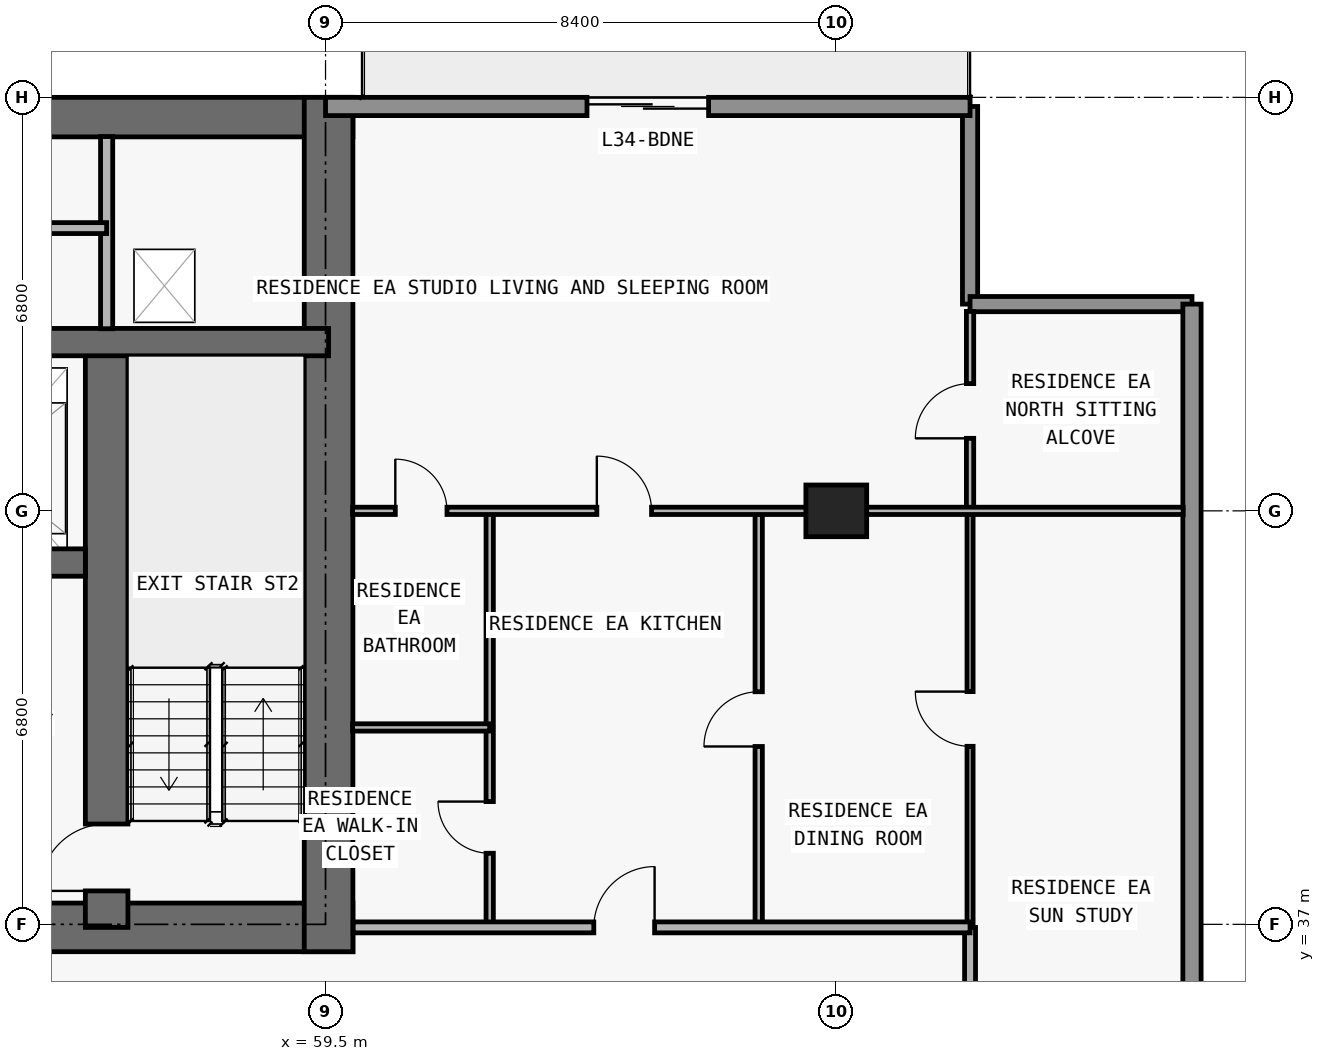
"""IFC4 building model, lengths in metres.
Left out: names, types, materials, properties, quantities, classifications, styles, units other than length and angle.
Written with IfcOpenShell. Run it as: python <this file> out.ifc"""

import sys

from ifc_helpers import new_model, si_unit, direction, frame, frame_2d, origin, origin_2d, place, context, subcontext, project, spatial, rectangle, extrude, element, fill, save


model = new_model("IFC4")
c1 = context("Model", 3, precision=1e-05, world=origin(), true_north=direction((0.0, 1.0)))
c2 = subcontext(c1, "Body", "Model", "MODEL_VIEW")
j1 = project(units=[si_unit("LENGTHUNIT", "METRE"), si_unit("PLANEANGLEUNIT", "RADIAN")], contexts=[c1])
p1 = place(None, origin())
s1 = spatial("IfcSite", under=j1, at=p1, CompositionType="ELEMENT")
p2 = place(p1, origin())
s2 = spatial("IfcBuilding", under=s1, at=p2, CompositionType="ELEMENT")
p3 = place(p2, frame((0.0, 0.0, 125.7)))
s3 = spatial("IfcBuildingStorey", under=s2, at=p3, CompositionType="ELEMENT", Elevation=125.7)
p4 = place(p3, frame((67.9, 43.8, 0.0), z_axis=(0.0, 0.0, 1.0), x_axis=(1.0, 0.0, 0.0)))
e1 = element("IfcColumn", 1, at=p4, inside=s3, PredefinedType="COLUMN", context=c2, shape_type="SweptSolid", body=[
    extrude(rectangle(XDim=1.0, YDim=0.85, at=origin_2d()), origin(), (0.0, 0.0, 1.0), 3.05),
])
p5 = place(p3, frame((17.85, 36.95, 0.0), z_axis=(0.0, 0.0, 1.0), x_axis=(1.0, 0.0, 0.0)))
e2 = element("IfcWall", 2, at=p5, inside=s3, PredefinedType="SHEAR", context=c2, shape_type="SweptSolid", body=[
    extrude(rectangle(XDim=42.1, YDim=0.8, at=frame_2d((21.05, 0.0))), origin(), (0.0, 0.0, 1.0), 3.05),
])
p6 = place(p5, frame((14.45, 0.0, 0.0)))
e3 = element("IfcOpeningElement", 3, at=p6, cuts=e2, PredefinedType="OPENING", context=c2, shape_type="SweptSolid", body=[
    extrude(rectangle(XDim=1.1, YDim=2.15, at=frame_2d((0.55, 1.075))), frame((0.0, 0.41, 0.0), z_axis=(0.0, -1.0, 0.0), x_axis=(1.0, 0.0, 0.0)), (0.0, 0.0, 1.0), 0.82),
])
p7 = place(p5, frame((6.3, 0.0, 0.0)))
e4 = element("IfcOpeningElement", 4, at=p7, cuts=e2, PredefinedType="OPENING", context=c2, shape_type="SweptSolid", body=[
    extrude(rectangle(XDim=1.05, YDim=2.15, at=frame_2d((0.525, 1.075))), frame((0.0, 0.41, 0.0), z_axis=(0.0, -1.0, 0.0), x_axis=(1.0, 0.0, 0.0)), (0.0, 0.0, 1.0), 0.82),
])
p8 = place(p5, frame((34.8, 0.0, 0.0)))
e5 = element("IfcOpeningElement", 5, at=p8, cuts=e2, PredefinedType="OPENING", context=c2, shape_type="SweptSolid", body=[
    extrude(rectangle(XDim=1.05, YDim=2.15, at=frame_2d((0.525, 1.075))), frame((0.0, 0.41, 0.0), z_axis=(0.0, -1.0, 0.0), x_axis=(1.0, 0.0, 0.0)), (0.0, 0.0, 1.0), 0.82),
])
p9 = place(p5, frame((10.913, 0.0, 0.0)))
e6 = element("IfcOpeningElement", 6, at=p9, cuts=e2, PredefinedType="OPENING", context=c2, shape_type="SweptSolid", body=[
    extrude(rectangle(XDim=1.05, YDim=2.15, at=frame_2d((0.525, 1.075))), frame((0.0, 0.41, 0.0), z_axis=(0.0, -1.0, 0.0), x_axis=(1.0, 0.0, 0.0)), (0.0, 0.0, 1.0), 0.82),
])
p10 = place(p5, frame((24.15, 0.0, 0.0)))
e7 = element("IfcOpeningElement", 7, at=p10, cuts=e2, PredefinedType="OPENING", context=c2, shape_type="SweptSolid", body=[
    extrude(rectangle(XDim=1.05, YDim=2.15, at=frame_2d((0.525, 1.075))), frame((0.0, 0.41, 0.0), z_axis=(0.0, -1.0, 0.0), x_axis=(1.0, 0.0, 0.0)), (0.0, 0.0, 1.0), 0.82),
])
p11 = place(p3, frame((17.85, 50.275, 0.0), z_axis=(0.0, 0.0, 1.0), x_axis=(1.0, 0.0, 0.0)))
e8 = element("IfcWall", 8, at=p11, inside=s3, PredefinedType="SHEAR", context=c2, shape_type="SweptSolid", body=[
    extrude(rectangle(XDim=42.1, YDim=0.65, at=frame_2d((21.05, 0.0))), origin(), (0.0, 0.0, 1.0), 3.05),
])
p12 = place(p3, frame((59.55, 36.55, 0.0), z_axis=(0.0, 0.0, 1.0), x_axis=(0.0, 1.0, 0.0)))
e9 = element("IfcWall", 9, at=p12, inside=s3, PredefinedType="SHEAR", context=c2, shape_type="SweptSolid", body=[
    extrude(rectangle(XDim=14.05, YDim=0.8, at=frame_2d((7.025, 0.0))), origin(), (0.0, 0.0, 1.0), 3.05),
])
p13 = place(p3, frame((55.9, 36.95, 0.0), z_axis=(0.0, 0.0, 1.0), x_axis=(0.0, 1.0, 0.0)))
e10 = element("IfcWall", 10, at=p13, inside=s3, PredefinedType="SHEAR", context=c2, shape_type="SweptSolid", body=[
    extrude(rectangle(XDim=9.625, YDim=0.7, at=frame_2d((4.812, 0.0))), origin(), (0.0, 0.0, 1.0), 3.05),
])
p14 = place(p13, frame((0.6, 0.0, 0.0)))
e11 = element("IfcOpeningElement", 11, at=p14, cuts=e10, PredefinedType="OPENING", context=c2, shape_type="SweptSolid", body=[
    extrude(rectangle(XDim=1.1, YDim=2.15, at=frame_2d((0.55, 1.075))), frame((0.0, 0.36, 0.0), z_axis=(0.0, -1.0, 0.0), x_axis=(1.0, 0.0, 0.0)), (0.0, 0.0, 1.0), 0.72),
])
p15 = place(p3, frame((22.25, 42.95, 0.0), z_axis=(0.0, 0.0, 1.0), x_axis=(1.0, 0.0, 0.0)))
e12 = element("IfcWall", 12, at=p15, inside=s3, PredefinedType="SHEAR", context=c2, shape_type="SweptSolid", body=[
    extrude(rectangle(XDim=33.3, YDim=0.45, at=frame_2d((16.65, 0.0))), origin(), (0.0, 0.0, 1.0), 3.05),
])
p16 = place(p15, frame((1.05, 0.0, 0.0)))
e13 = element("IfcOpeningElement", 13, at=p16, cuts=e12, PredefinedType="OPENING", context=c2, shape_type="SweptSolid", body=[
    extrude(rectangle(XDim=1.2, YDim=2.2, at=frame_2d((0.6, 1.1))), frame((0.0, 0.235, 0.0), z_axis=(0.0, -1.0, 0.0), x_axis=(1.0, 0.0, 0.0)), (0.0, 0.0, 1.0), 0.47),
])
p17 = place(p15, frame((31.05, 0.0, 0.0)))
e14 = element("IfcOpeningElement", 14, at=p17, cuts=e12, PredefinedType="OPENING", context=c2, shape_type="SweptSolid", body=[
    extrude(rectangle(XDim=1.2, YDim=2.2, at=frame_2d((0.6, 1.1))), frame((0.0, 0.235, 0.0), z_axis=(0.0, -1.0, 0.0), x_axis=(1.0, 0.0, 0.0)), (0.0, 0.0, 1.0), 0.47),
])
p18 = place(p15, frame((21.4, 0.0, 0.0)))
e15 = element("IfcOpeningElement", 15, at=p18, cuts=e12, PredefinedType="OPENING", context=c2, shape_type="SweptSolid", body=[
    extrude(rectangle(XDim=1.1, YDim=2.2, at=frame_2d((0.55, 1.1))), frame((0.0, 0.235, 0.0), z_axis=(0.0, -1.0, 0.0), x_axis=(1.0, 0.0, 0.0)), (0.0, 0.0, 1.0), 0.47),
])
p19 = place(p15, frame((24.0, 0.0, 0.0)))
e16 = element("IfcOpeningElement", 16, at=p19, cuts=e12, PredefinedType="OPENING", context=c2, shape_type="SweptSolid", body=[
    extrude(rectangle(XDim=1.1, YDim=2.2, at=frame_2d((0.55, 1.1))), frame((0.0, 0.235, 0.0), z_axis=(0.0, -1.0, 0.0), x_axis=(1.0, 0.0, 0.0)), (0.0, 0.0, 1.0), 0.47),
])
p20 = place(p15, frame((3.625, 0.0, 0.0)))
e17 = element("IfcOpeningElement", 17, at=p20, cuts=e12, PredefinedType="OPENING", context=c2, shape_type="SweptSolid", body=[
    extrude(rectangle(XDim=1.05, YDim=2.15, at=frame_2d((0.525, 1.075))), frame((0.0, 0.235, 0.0), z_axis=(0.0, -1.0, 0.0), x_axis=(1.0, 0.0, 0.0)), (0.0, 0.0, 1.0), 0.47),
])
p21 = place(p15, frame((28.675, 0.0, 0.0)))
e18 = element("IfcOpeningElement", 18, at=p21, cuts=e12, PredefinedType="OPENING", context=c2, shape_type="SweptSolid", body=[
    extrude(rectangle(XDim=1.05, YDim=2.15, at=frame_2d((0.525, 1.075))), frame((0.0, 0.235, 0.0), z_axis=(0.0, -1.0, 0.0), x_axis=(1.0, 0.0, 0.0)), (0.0, 0.0, 1.0), 0.47),
])
p22 = place(p15, frame((15.975, 0.0, 0.0)))
e19 = element("IfcOpeningElement", 19, at=p22, cuts=e12, PredefinedType="OPENING", context=c2, shape_type="SweptSolid", body=[
    extrude(rectangle(XDim=1.0, YDim=2.2, at=frame_2d((0.5, 1.1))), frame((0.0, 0.235, 0.0), z_axis=(0.0, -1.0, 0.0), x_axis=(1.0, 0.0, 0.0)), (0.0, 0.0, 1.0), 0.47),
])
p23 = place(p3, frame((18.25, 46.575, 0.0), z_axis=(0.0, 0.0, 1.0), x_axis=(1.0, 0.0, 0.0)))
e20 = element("IfcWall", 20, at=p23, inside=s3, PredefinedType="SHEAR", context=c2, shape_type="SweptSolid", body=[
    extrude(rectangle(XDim=41.3, YDim=0.45, at=frame_2d((20.65, 0.0))), origin(), (0.0, 0.0, 1.0), 3.05),
])
p24 = place(p23, frame((7.625, 0.0, 0.0)))
e21 = element("IfcOpeningElement", 21, at=p24, cuts=e20, PredefinedType="OPENING", context=c2, shape_type="SweptSolid", body=[
    extrude(rectangle(XDim=1.05, YDim=2.15, at=frame_2d((0.525, 1.075))), frame((0.0, 0.235, 0.0), z_axis=(0.0, -1.0, 0.0), x_axis=(1.0, 0.0, 0.0)), (0.0, 0.0, 1.0), 0.47),
])
p25 = place(p23, frame((32.675, 0.0, 0.0)))
e22 = element("IfcOpeningElement", 22, at=p25, cuts=e20, PredefinedType="OPENING", context=c2, shape_type="SweptSolid", body=[
    extrude(rectangle(XDim=1.05, YDim=2.15, at=frame_2d((0.525, 1.075))), frame((0.0, 0.235, 0.0), z_axis=(0.0, -1.0, 0.0), x_axis=(1.0, 0.0, 0.0)), (0.0, 0.0, 1.0), 0.47),
])
p26 = place(p3, frame((70.1, 50.45, 0.0), z_axis=(0.0, 0.0, 1.0), x_axis=(0.0, -1.0, 0.0)))
e23 = element("IfcWall", 23, at=p26, inside=s3, PredefinedType="ELEMENTEDWALL", context=c2, shape_type="SweptSolid", body=[
    extrude(rectangle(XDim=3.25, YDim=0.25, at=frame_2d((1.625, 0.0))), origin(), (0.0, 0.0, 1.0), 3.05),
])
p27 = place(p3, frame((70.1, 47.2, 0.0), z_axis=(0.0, 0.0, 1.0), x_axis=(1.0, 0.0, 0.0)))
e24 = element("IfcWall", 24, at=p27, inside=s3, PredefinedType="ELEMENTEDWALL", context=c2, shape_type="SweptSolid", body=[
    extrude(rectangle(XDim=3.65, YDim=0.25, at=frame_2d((1.825, 0.0))), origin(), (0.0, 0.0, 1.0), 3.05),
])
p28 = place(p3, frame((73.75, 47.2, 0.0), z_axis=(0.0, 0.0, 1.0), x_axis=(0.0, -1.0, 0.0)))
e25 = element("IfcWall", 25, at=p28, inside=s3, PredefinedType="STANDARD", context=c2, shape_type="SweptSolid", body=[
    extrude(rectangle(XDim=19.2, YDim=0.3, at=frame_2d((9.6, 0.0))), origin(), (0.0, 0.0, 1.0), 3.05),
])
p29 = place(p3, frame((59.5, 50.45, 0.0), z_axis=(0.0, 0.0, 1.0), x_axis=(1.0, 0.0, 0.0)))
e26 = element("IfcWall", 26, at=p29, inside=s3, PredefinedType="STANDARD", context=c2, shape_type="SweptSolid", body=[
    extrude(rectangle(XDim=10.6, YDim=0.3, at=frame_2d((5.3, 0.0))), origin(), (0.0, 0.0, 1.0), 3.05),
])
p30 = place(p29, frame((4.3, 0.0, 0.0)))
e27 = element("IfcOpeningElement", 27, at=p30, cuts=e26, PredefinedType="OPENING", context=c2, shape_type="SweptSolid", body=[
    extrude(rectangle(XDim=2.0, YDim=2.3, at=frame_2d((1.0, 1.15))), frame((0.0, 0.16, 0.0), z_axis=(0.0, -1.0, 0.0), x_axis=(1.0, 0.0, 0.0)), (0.0, 0.0, 1.0), 0.32),
])
p31 = place(p3, frame((55.9, 46.795, 0.0), z_axis=(0.0, 0.0, 1.0), x_axis=(0.0, 1.0, 0.0)))
e28 = element("IfcWall", 28, at=p31, inside=s3, PredefinedType="PARTITIONING", context=c2, shape_type="SweptSolid", body=[
    extrude(rectangle(XDim=3.16, YDim=0.2, at=frame_2d((1.58, 0.0))), origin(), (0.0, 0.0, 1.0), 3.05),
])
p32 = place(p3, frame((62.2, 36.95, 0.0), z_axis=(0.0, 0.0, 1.0), x_axis=(0.0, 1.0, 0.0)))
e29 = element("IfcWall", 29, at=p32, inside=s3, PredefinedType="PARTITIONING", context=c2, shape_type="SweptSolid", body=[
    extrude(rectangle(XDim=6.85, YDim=0.12, at=frame_2d((3.425, 0.0))), origin(), (0.0, 0.0, 1.0), 3.05),
])
p33 = place(p32, frame((1.219, 0.0, 0.0)))
e30 = element("IfcOpeningElement", 30, at=p33, cuts=e29, PredefinedType="OPENING", context=c2, shape_type="SweptSolid", body=[
    extrude(rectangle(XDim=0.85, YDim=2.1, at=frame_2d((0.425, 1.05))), frame((0.0, 0.07, 0.0), z_axis=(0.0, -1.0, 0.0), x_axis=(1.0, 0.0, 0.0)), (0.0, 0.0, 1.0), 0.14),
])
p34 = place(p3, frame((66.624, 36.95, 0.0), z_axis=(0.0, 0.0, 1.0), x_axis=(0.0, 1.0, 0.0)))
e31 = element("IfcWall", 31, at=p34, inside=s3, PredefinedType="PARTITIONING", context=c2, shape_type="SweptSolid", body=[
    extrude(rectangle(XDim=6.85, YDim=0.12, at=frame_2d((3.425, 0.0))), origin(), (0.0, 0.0, 1.0), 3.05),
])
p35 = place(p34, frame((2.975, 0.0, 0.0)))
e32 = element("IfcOpeningElement", 32, at=p35, cuts=e31, PredefinedType="OPENING", context=c2, shape_type="SweptSolid", body=[
    extrude(rectangle(XDim=0.9, YDim=2.15, at=frame_2d((0.45, 1.075))), frame((0.0, 0.07, 0.0), z_axis=(0.0, -1.0, 0.0), x_axis=(1.0, 0.0, 0.0)), (0.0, 0.0, 1.0), 0.14),
])
p36 = place(p3, frame((70.1, 34.705, 0.0), z_axis=(0.0, 0.0, 1.0), x_axis=(0.0, 1.0, 0.0)))
e33 = element("IfcWall", 33, at=p36, inside=s3, PredefinedType="PARTITIONING", context=c2, shape_type="SweptSolid", body=[
    extrude(rectangle(XDim=2.245, YDim=0.18, at=frame_2d((1.123, 0.0))), origin(), (0.0, 0.0, 1.0), 3.05),
])
p37 = place(p3, frame((70.1, 36.955, 0.0), z_axis=(0.0, 0.0, 1.0), x_axis=(0.0, 1.0, 0.0)))
e34 = element("IfcWall", 34, at=p37, inside=s3, PredefinedType="MOVABLE", context=c2, shape_type="SweptSolid", body=[
    extrude(rectangle(XDim=6.845, YDim=0.1, at=frame_2d((3.422, 0.0))), origin(), (0.0, 0.0, 1.0), 3.05),
])
p38 = place(p37, frame((2.972, 0.0, 0.0)))
e35 = element("IfcOpeningElement", 35, at=p38, cuts=e34, PredefinedType="OPENING", context=c2, shape_type="SweptSolid", body=[
    extrude(rectangle(XDim=0.9, YDim=2.15, at=frame_2d((0.45, 1.075))), frame((0.0, 0.06, 0.0), z_axis=(0.0, -1.0, 0.0), x_axis=(1.0, 0.0, 0.0)), (0.0, 0.0, 1.0), 0.12),
])
p39 = place(p3, frame((70.1, 43.805, 0.0), z_axis=(0.0, 0.0, 1.0), x_axis=(0.0, 1.0, 0.0)))
e36 = element("IfcWall", 36, at=p39, inside=s3, PredefinedType="PARTITIONING", context=c2, shape_type="SweptSolid", body=[
    extrude(rectangle(XDim=3.275, YDim=0.12, at=frame_2d((1.638, 0.0))), origin(), (0.0, 0.0, 1.0), 3.05),
])
p40 = place(p39, frame((1.188, 0.0, 0.0)))
e37 = element("IfcOpeningElement", 37, at=p40, cuts=e36, PredefinedType="OPENING", context=c2, shape_type="SweptSolid", body=[
    extrude(rectangle(XDim=0.9, YDim=2.15, at=frame_2d((0.45, 1.075))), frame((0.0, 0.07, 0.0), z_axis=(0.0, -1.0, 0.0), x_axis=(1.0, 0.0, 0.0)), (0.0, 0.0, 1.0), 0.14),
])
p41 = place(p3, frame((59.955, 36.95, 0.0), z_axis=(0.0, 0.0, 1.0), x_axis=(1.0, 0.0, 0.0)))
e38 = element("IfcWall", 38, at=p41, inside=s3, PredefinedType="PARTITIONING", context=c2, shape_type="SweptSolid", body=[
    extrude(rectangle(XDim=10.145, YDim=0.18, at=frame_2d((5.073, 0.0))), origin(), (0.0, 0.0, 1.0), 3.05),
])
p42 = place(p41, frame((3.957, 0.0, 0.0)))
e39 = element("IfcOpeningElement", 39, at=p42, cuts=e38, PredefinedType="OPENING", context=c2, shape_type="SweptSolid", body=[
    extrude(rectangle(XDim=1.0, YDim=2.2, at=frame_2d((0.5, 1.1))), frame((0.0, 0.1, 0.0), z_axis=(0.0, -1.0, 0.0), x_axis=(1.0, 0.0, 0.0)), (0.0, 0.0, 1.0), 0.2),
])
p43 = place(p3, frame((59.945, 40.238, 0.0), z_axis=(0.0, 0.0, 1.0), x_axis=(1.0, 0.0, 0.0)))
e40 = element("IfcWall", 40, at=p43, inside=s3, PredefinedType="PARTITIONING", context=c2, shape_type="SweptSolid", body=[
    extrude(rectangle(XDim=2.255, YDim=0.12, at=frame_2d((1.127, 0.0))), origin(), (0.0, 0.0, 1.0), 3.05),
])
p44 = place(p3, frame((59.945, 43.8, 0.0), z_axis=(0.0, 0.0, 1.0), x_axis=(1.0, 0.0, 0.0)))
e41 = element("IfcWall", 41, at=p44, inside=s3, PredefinedType="PARTITIONING", context=c2, shape_type="SweptSolid", body=[
    extrude(rectangle(XDim=13.66, YDim=0.12, at=frame_2d((6.83, 0.0))), origin(), (0.0, 0.0, 1.0), 2.339),
])
p45 = place(p44, frame((4.017, 0.0, 0.0)))
e42 = element("IfcOpeningElement", 42, at=p45, cuts=e41, PredefinedType="OPENING", context=c2, shape_type="SweptSolid", body=[
    extrude(rectangle(XDim=0.9, YDim=2.15, at=frame_2d((0.45, 1.075))), frame((0.0, 0.07, 0.0), z_axis=(0.0, -1.0, 0.0), x_axis=(1.0, 0.0, 0.0)), (0.0, 0.0, 1.0), 0.14),
])
p46 = place(p44, frame((0.702, 0.0, 0.0)))
e43 = element("IfcOpeningElement", 43, at=p46, cuts=e41, PredefinedType="OPENING", context=c2, shape_type="SweptSolid", body=[
    extrude(rectangle(XDim=0.85, YDim=2.1, at=frame_2d((0.425, 1.05))), frame((0.0, 0.07, 0.0), z_axis=(0.0, -1.0, 0.0), x_axis=(1.0, 0.0, 0.0)), (0.0, 0.0, 1.0), 0.14),
])
p47 = place(p3, frame((26.7, 48.45, 0.0), z_axis=(0.0, 0.0, 1.0), x_axis=(1.0, 0.0, 0.0)))
e44 = element("IfcWall", 44, at=p47, inside=s3, PredefinedType="PARTITIONING", context=c2, shape_type="SweptSolid", body=[
    extrude(rectangle(XDim=29.2, YDim=0.18, at=frame_2d((14.6, 0.0))), origin(), (0.0, 0.0, 1.0), 3.05),
])
p48 = place(p47, frame((1.75, 0.0, 0.0)))
e45 = element("IfcOpeningElement", 45, at=p48, cuts=e44, PredefinedType="OPENING", context=c2, shape_type="SweptSolid", body=[
    extrude(rectangle(XDim=1.2, YDim=2.2, at=frame_2d((0.6, 1.1))), frame((0.0, 0.1, 0.0), z_axis=(0.0, -1.0, 0.0), x_axis=(1.0, 0.0, 0.0)), (0.0, 0.0, 1.0), 0.2),
])
p49 = place(p47, frame((6.475, 0.0, 0.0)))
e46 = element("IfcOpeningElement", 46, at=p49, cuts=e44, PredefinedType="OPENING", context=c2, shape_type="SweptSolid", body=[
    extrude(rectangle(XDim=1.2, YDim=2.2, at=frame_2d((0.6, 1.1))), frame((0.0, 0.1, 0.0), z_axis=(0.0, -1.0, 0.0), x_axis=(1.0, 0.0, 0.0)), (0.0, 0.0, 1.0), 0.2),
])
p50 = place(p47, frame((14.05, 0.0, 0.0)))
e47 = element("IfcOpeningElement", 47, at=p50, cuts=e44, PredefinedType="OPENING", context=c2, shape_type="SweptSolid", body=[
    extrude(rectangle(XDim=1.0, YDim=2.2, at=frame_2d((0.5, 1.1))), frame((0.0, 0.1, 0.0), z_axis=(0.0, -1.0, 0.0), x_axis=(1.0, 0.0, 0.0)), (0.0, 0.0, 1.0), 0.2),
])
p51 = place(p47, frame((21.425, 0.0, 0.0)))
e48 = element("IfcOpeningElement", 48, at=p51, cuts=e44, PredefinedType="OPENING", context=c2, shape_type="SweptSolid", body=[
    extrude(rectangle(XDim=1.2, YDim=2.2, at=frame_2d((0.6, 1.1))), frame((0.0, 0.1, 0.0), z_axis=(0.0, -1.0, 0.0), x_axis=(1.0, 0.0, 0.0)), (0.0, 0.0, 1.0), 0.2),
])
p52 = place(p47, frame((26.375, 0.0, 0.0)))
e49 = element("IfcOpeningElement", 49, at=p52, cuts=e44, PredefinedType="OPENING", context=c2, shape_type="SweptSolid", body=[
    extrude(rectangle(XDim=0.85, YDim=2.1, at=frame_2d((0.425, 1.05))), frame((0.0, 0.1, 0.0), z_axis=(0.0, -1.0, 0.0), x_axis=(1.0, 0.0, 0.0)), (0.0, 0.0, 1.0), 0.2),
])
p53 = place(p30, origin())
e50 = element("IfcDoor", 50, at=p53, inside=s3, OperationType="DOUBLE_DOOR_SLIDING", PredefinedType="DOOR", context=c2, shape_type="SweptSolid", body=[
    extrude(rectangle(XDim=2.0, YDim=2.3, at=frame_2d((1.0, 1.15))), frame((0.0, 0.025, 0.0), z_axis=(0.0, -1.0, 0.0), x_axis=(1.0, 0.0, 0.0)), (0.0, 0.0, 1.0), 0.05),
])
fill(e27, e50)
p54 = place(p14, origin())
e51 = element("IfcDoor", 51, at=p54, inside=s3, OperationType="SINGLE_SWING_LEFT", PredefinedType="DOOR", context=c2, shape_type="SweptSolid", body=[
    extrude(rectangle(XDim=1.1, YDim=2.15, at=frame_2d((0.55, 1.075))), frame((0.0, 0.025, 0.0), z_axis=(0.0, -1.0, 0.0), x_axis=(1.0, 0.0, 0.0)), (0.0, 0.0, 1.0), 0.05),
])
fill(e11, e51)
p55 = place(p35, origin())
e52 = element("IfcDoor", 52, at=p55, inside=s3, OperationType="SINGLE_SWING_LEFT", PredefinedType="DOOR", context=c2, shape_type="SweptSolid", body=[
    extrude(rectangle(XDim=0.9, YDim=2.15, at=frame_2d((0.45, 1.075))), frame((0.0, 0.025, 0.0), z_axis=(0.0, -1.0, 0.0), x_axis=(1.0, 0.0, 0.0)), (0.0, 0.0, 1.0), 0.05),
])
fill(e32, e52)
p56 = place(p42, origin())
e53 = element("IfcDoor", 53, at=p56, inside=s3, OperationType="SINGLE_SWING_RIGHT", PredefinedType="DOOR", context=c2, shape_type="SweptSolid", body=[
    extrude(rectangle(XDim=1.0, YDim=2.2, at=frame_2d((0.5, 1.1))), frame((0.0, 0.025, 0.0), z_axis=(0.0, -1.0, 0.0), x_axis=(1.0, 0.0, 0.0)), (0.0, 0.0, 1.0), 0.05),
])
fill(e39, e53)
p57 = place(p45, origin())
e54 = element("IfcDoor", 54, at=p57, inside=s3, OperationType="SINGLE_SWING_LEFT", PredefinedType="DOOR", context=c2, shape_type="SweptSolid", body=[
    extrude(rectangle(XDim=0.9, YDim=2.15, at=frame_2d((0.45, 1.075))), frame((0.0, 0.025, 0.0), z_axis=(0.0, -1.0, 0.0), x_axis=(1.0, 0.0, 0.0)), (0.0, 0.0, 1.0), 0.05),
])
fill(e42, e54)
p58 = place(p33, origin())
e55 = element("IfcDoor", 55, at=p58, inside=s3, OperationType="SINGLE_SWING_RIGHT", PredefinedType="DOOR", context=c2, shape_type="SweptSolid", body=[
    extrude(rectangle(XDim=0.85, YDim=2.1, at=frame_2d((0.425, 1.05))), frame((0.0, 0.025, 0.0), z_axis=(0.0, -1.0, 0.0), x_axis=(1.0, 0.0, 0.0)), (0.0, 0.0, 1.0), 0.05),
])
fill(e30, e55)
p59 = place(p46, origin())
e56 = element("IfcDoor", 56, at=p59, inside=s3, OperationType="SINGLE_SWING_LEFT", PredefinedType="DOOR", context=c2, shape_type="SweptSolid", body=[
    extrude(rectangle(XDim=0.85, YDim=2.1, at=frame_2d((0.425, 1.05))), frame((0.0, 0.025, 0.0), z_axis=(0.0, -1.0, 0.0), x_axis=(1.0, 0.0, 0.0)), (0.0, 0.0, 1.0), 0.05),
])
fill(e43, e56)
p60 = place(p38, origin())
e57 = element("IfcDoor", 57, at=p60, inside=s3, OperationType="SINGLE_SWING_RIGHT", PredefinedType="DOOR", context=c2, shape_type="SweptSolid", body=[
    extrude(rectangle(XDim=0.9, YDim=2.15, at=frame_2d((0.45, 1.075))), frame((0.0, 0.025, 0.0), z_axis=(0.0, -1.0, 0.0), x_axis=(1.0, 0.0, 0.0)), (0.0, 0.0, 1.0), 0.05),
])
fill(e35, e57)
p61 = place(p40, origin())
e58 = element("IfcDoor", 58, at=p61, inside=s3, OperationType="SINGLE_SWING_LEFT", PredefinedType="DOOR", context=c2, shape_type="SweptSolid", body=[
    extrude(rectangle(XDim=0.9, YDim=2.15, at=frame_2d((0.45, 1.075))), frame((0.0, 0.025, 0.0), z_axis=(0.0, -1.0, 0.0), x_axis=(1.0, 0.0, 0.0)), (0.0, 0.0, 1.0), 0.05),
])
fill(e37, e58)
save(model, sys.argv[1])
